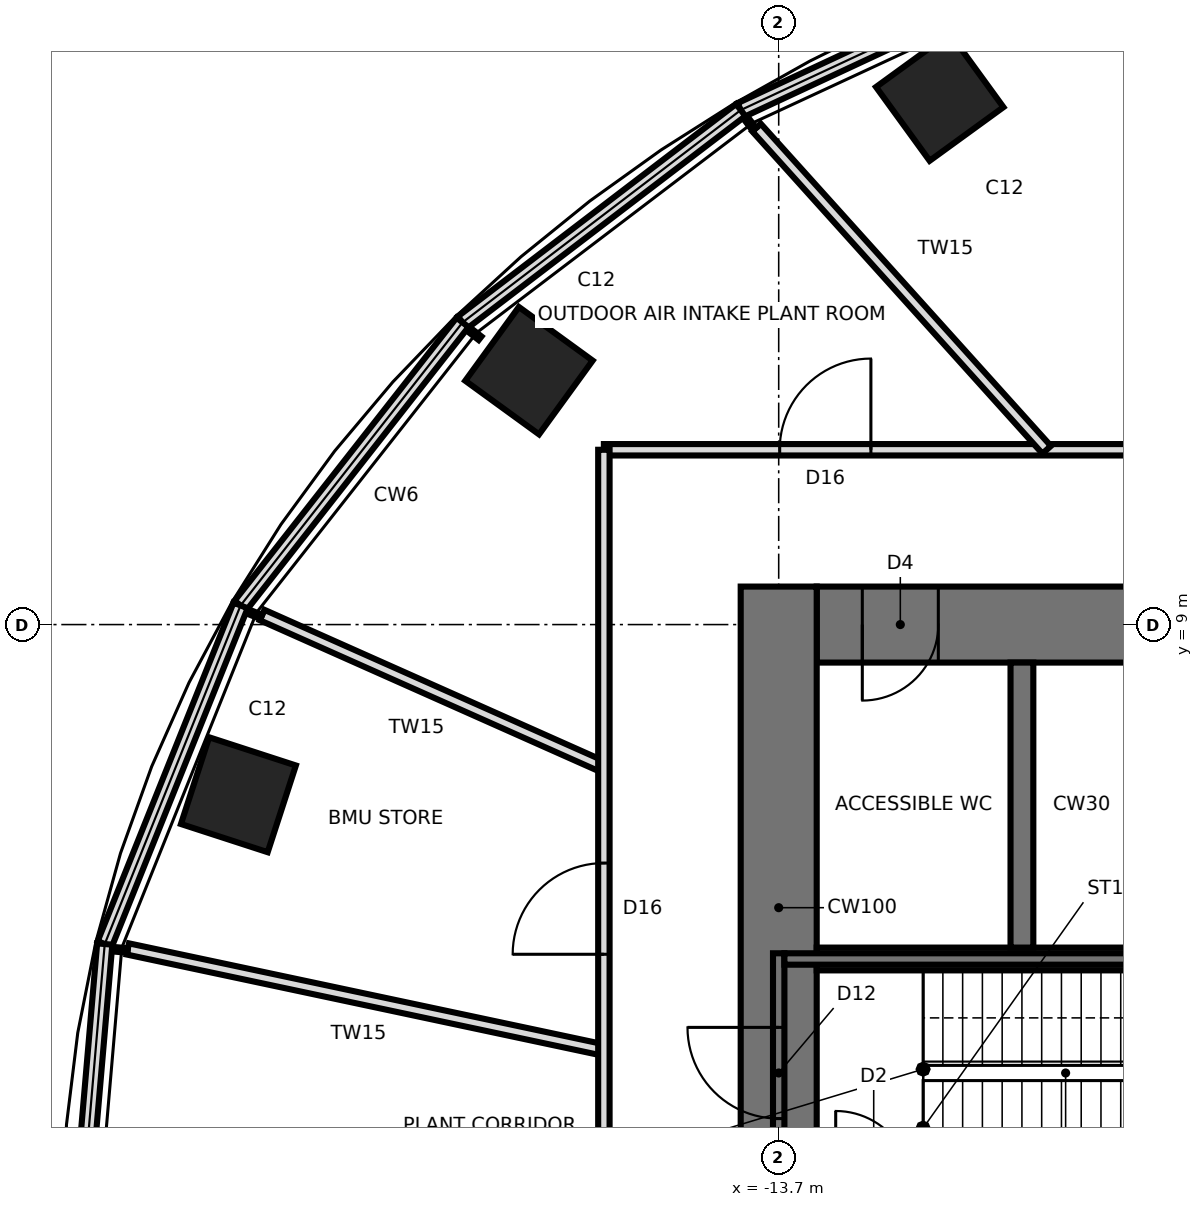
"""IFC4 building model, lengths in metres.
Left out: names, types, materials, properties, quantities, classifications, styles, units other than length and angle.
Written with IfcOpenShell. Run it as: python <this file> out.ifc"""

import sys

from ifc_helpers import new_model, si_unit, direction, frame, frame_2d, origin, origin_2d, place, context, subcontext, project, spatial, rectangle, extrude, element, fill, save


model = new_model("IFC4")
c1 = context("Model", 3, precision=1e-05, world=origin(), true_north=direction((0.0, 1.0)))
c2 = subcontext(c1, "Body", "Model", "MODEL_VIEW")
j1 = project(units=[si_unit("LENGTHUNIT", "METRE"), si_unit("PLANEANGLEUNIT", "RADIAN")], contexts=[c1])
p1 = place(None, origin())
s1 = spatial("IfcSite", under=j1, at=p1, CompositionType="ELEMENT")
p2 = place(p1, origin())
s2 = spatial("IfcBuilding", under=s1, at=p2, CompositionType="ELEMENT")
p3 = place(p2, frame((0.0, 0.0, 277.0)))
s3 = spatial("IfcBuildingStorey", under=s2, at=p3, CompositionType="ELEMENT", Elevation=277.0)
for number, where, z_axis, x_axis in (
    (1, (-11.581, 15.94, 0.0), (0.0, 0.0, 1.0), (-0.588, 0.809, 0.0)),
    (2, (-16.986, 12.341, 0.0), (0.0, 0.0, 1.0), (-0.809, 0.588, 0.0)),
    (3, (-20.808, 6.761, 0.0), (0.0, 0.0, 1.0), (-0.951, 0.309, 0.0)),
):
    element("IfcColumn", number, at=place(p3, frame(where, z_axis=z_axis, x_axis=x_axis)), inside=s3, PredefinedType="COLUMN", context=c2, shape_type="SweptSolid", body=[
        extrude(rectangle(XDim=1.2, YDim=1.2, at=origin_2d()), origin(), (0.0, 0.0, 1.0), 5.0),
    ])
p4 = place(p3, frame((13.2, 9.0, 0.0), z_axis=(0.0, 0.0, 1.0), x_axis=(-1.0, 0.0, 0.0)))
e4 = element("IfcWall", 4, at=p4, inside=s3, PredefinedType="SHEAR", context=c2, shape_type="SweptSolid", body=[
    extrude(rectangle(XDim=26.4, YDim=1.0, at=frame_2d((13.2, 0.0))), origin(), (0.0, 0.0, 1.0), 5.0),
])
p5 = place(p4, frame((2.65, 0.0, 0.0)))
e5 = element("IfcOpeningElement", 5, at=p5, cuts=e4, PredefinedType="OPENING", context=c2, shape_type="SweptSolid", body=[
    extrude(rectangle(XDim=0.9, YDim=2.1, at=frame_2d((0.45, 1.05))), frame((0.0, 0.51, 0.0), z_axis=(0.0, -1.0, 0.0), x_axis=(1.0, 0.0, 0.0)), (0.0, 0.0, 1.0), 1.02),
])
p6 = place(p4, frame((9.5, 0.0, 0.0)))
e6 = element("IfcOpeningElement", 6, at=p6, cuts=e4, PredefinedType="OPENING", context=c2, shape_type="SweptSolid", body=[
    extrude(rectangle(XDim=0.9, YDim=2.1, at=frame_2d((0.45, 1.05))), frame((0.0, 0.51, 0.0), z_axis=(0.0, -1.0, 0.0), x_axis=(1.0, 0.0, 0.0)), (0.0, 0.0, 1.0), 1.02),
])
p7 = place(p4, frame((16.0, 0.0, 0.0)))
e7 = element("IfcOpeningElement", 7, at=p7, cuts=e4, PredefinedType="OPENING", context=c2, shape_type="SweptSolid", body=[
    extrude(rectangle(XDim=0.9, YDim=2.1, at=frame_2d((0.45, 1.05))), frame((0.0, 0.51, 0.0), z_axis=(0.0, -1.0, 0.0), x_axis=(1.0, 0.0, 0.0)), (0.0, 0.0, 1.0), 1.02),
])
p8 = place(p4, frame((21.25, 0.0, 0.0)))
e8 = element("IfcOpeningElement", 8, at=p8, cuts=e4, PredefinedType="OPENING", context=c2, shape_type="SweptSolid", body=[
    extrude(rectangle(XDim=0.9, YDim=2.1, at=frame_2d((0.45, 1.05))), frame((0.0, 0.51, 0.0), z_axis=(0.0, -1.0, 0.0), x_axis=(1.0, 0.0, 0.0)), (0.0, 0.0, 1.0), 1.02),
])
p9 = place(p4, frame((24.8, 0.0, 0.0)))
e9 = element("IfcOpeningElement", 9, at=p9, cuts=e4, PredefinedType="OPENING", context=c2, shape_type="SweptSolid", body=[
    extrude(rectangle(XDim=1.0, YDim=2.1, at=frame_2d((0.5, 1.05))), frame((0.0, 0.51, 0.0), z_axis=(0.0, -1.0, 0.0), x_axis=(1.0, 0.0, 0.0)), (0.0, 0.0, 1.0), 1.02),
])
p10 = place(p3, frame((-13.7, 9.5, 0.0), z_axis=(0.0, 0.0, 1.0), x_axis=(0.0, -1.0, 0.0)))
e10 = element("IfcWall", 10, at=p10, inside=s3, PredefinedType="SHEAR", context=c2, shape_type="SweptSolid", body=[
    extrude(rectangle(XDim=19.0, YDim=1.0, at=frame_2d((9.5, 0.0))), origin(), (0.0, 0.0, 1.0), 5.0),
])
p11 = place(p10, frame((8.6, 0.0, 0.0)))
e11 = element("IfcOpeningElement", 11, at=p11, cuts=e10, PredefinedType="OPENING", context=c2, shape_type="SweptSolid", body=[
    extrude(rectangle(XDim=1.8, YDim=2.4, at=frame_2d((0.9, 1.2))), frame((0.0, 0.51, 0.0), z_axis=(0.0, -1.0, 0.0), x_axis=(1.0, 0.0, 0.0)), (0.0, 0.0, 1.0), 1.02),
])
p12 = place(p3, frame((-13.2, 4.6, 0.0), z_axis=(0.0, 0.0, 1.0), x_axis=(1.0, 0.0, 0.0)))
e12 = element("IfcWall", 12, at=p12, inside=s3, PredefinedType="SHEAR", context=c2, shape_type="SweptSolid", body=[
    extrude(rectangle(XDim=26.4, YDim=0.3, at=frame_2d((13.2, 0.0))), origin(), (0.0, 0.0, 1.0), 5.0),
])
p13 = place(p3, frame((-10.5, 4.75, 0.0), z_axis=(0.0, 0.0, 1.0), x_axis=(0.0, 1.0, 0.0)))
e13 = element("IfcWall", 13, at=p13, inside=s3, PredefinedType="SHEAR", context=c2, shape_type="SweptSolid", body=[
    extrude(rectangle(XDim=3.75, YDim=0.3, at=frame_2d((1.875, 0.0))), origin(), (0.0, 0.0, 1.0), 5.0),
])
p14 = place(p3, frame((-10.186, 17.642, 5.0), z_axis=(0.0, 0.0, 1.0), x_axis=(-0.906246502857, -0.422749661217, 0.0)))
e14 = element("IfcWall", 14, at=p14, inside=s3, PredefinedType="PARAPET", context=c2, shape_type="SweptSolid", body=[
    extrude(rectangle(XDim=4.429, YDim=0.2, at=frame_2d((2.214, 0.0))), origin(), (0.0, 0.0, 1.0), 0.4),
])
p15 = place(p3, frame((-14.199, 15.77, 5.0), z_axis=(0.0, 0.0, 1.0), x_axis=(-0.794855686591, -0.606798514743, 0.0)))
e15 = element("IfcWall", 15, at=p15, inside=s3, PredefinedType="PARAPET", context=c2, shape_type="SweptSolid", body=[
    extrude(rectangle(XDim=4.605, YDim=0.2, at=frame_2d((2.302, 0.0))), origin(), (0.0, 0.0, 1.0), 0.4),
])
p16 = place(p3, frame((-17.859, 12.976, 5.0), z_axis=(0.0, 0.0, 1.0), x_axis=(-0.617103610012, -0.78688190633, 0.0)))
e16 = element("IfcWall", 16, at=p16, inside=s3, PredefinedType="PARAPET", context=c2, shape_type="SweptSolid", body=[
    extrude(rectangle(XDim=4.732, YDim=0.2, at=frame_2d((2.366, 0.0))), origin(), (0.0, 0.0, 1.0), 0.4),
])
p17 = place(p3, frame((-20.78, 9.252, 5.0), z_axis=(0.0, 0.0, 1.0), x_axis=(-0.372363873994, -0.928086819939, 0.0)))
e17 = element("IfcWall", 17, at=p17, inside=s3, PredefinedType="PARAPET", context=c2, shape_type="SweptSolid", body=[
    extrude(rectangle(XDim=4.8, YDim=0.2, at=frame_2d((2.4, 0.0))), origin(), (0.0, 0.0, 1.0), 0.4),
])
p18 = place(p3, frame((-22.567, 4.797, 5.0), z_axis=(0.0, 0.0, 1.0), x_axis=(-0.085747752545, -0.996316878776, 0.0)))
e18 = element("IfcWall", 18, at=p18, inside=s3, PredefinedType="PARAPET", context=c2, shape_type="SweptSolid", body=[
    extrude(rectangle(XDim=4.815, YDim=0.2, at=frame_2d((2.407, 0.0))), origin(), (0.0, 0.0, 1.0), 0.4),
])
p19 = place(p3, frame((16.0, 11.3, 0.0), z_axis=(0.0, 0.0, 1.0), x_axis=(-1.0, 0.0, 0.0)))
e19 = element("IfcWall", 19, at=p19, inside=s3, PredefinedType="PARTITIONING", context=c2, shape_type="SweptSolid", body=[
    extrude(rectangle(XDim=32.0, YDim=0.15, at=frame_2d((16.0, 0.0))), origin(), (0.0, 0.0, 1.0), 4.75),
])
p20 = place(p19, frame((3.813, 0.0, 0.0)))
e20 = element("IfcOpeningElement", 20, at=p20, cuts=e19, PredefinedType="OPENING", context=c2, shape_type="SweptSolid", body=[
    extrude(rectangle(XDim=1.8, YDim=2.4, at=frame_2d((0.9, 1.2))), frame((0.0, 0.085, 0.0), z_axis=(0.0, -1.0, 0.0), x_axis=(1.0, 0.0, 0.0)), (0.0, 0.0, 1.0), 0.17),
])
p21 = place(p19, frame((12.732, 0.0, 0.0)))
e21 = element("IfcOpeningElement", 21, at=p21, cuts=e19, PredefinedType="OPENING", context=c2, shape_type="SweptSolid", body=[
    extrude(rectangle(XDim=1.2, YDim=2.1, at=frame_2d((0.6, 1.05))), frame((0.0, 0.085, 0.0), z_axis=(0.0, -1.0, 0.0), x_axis=(1.0, 0.0, 0.0)), (0.0, 0.0, 1.0), 0.17),
])
p22 = place(p19, frame((20.806, 0.0, 0.0)))
e22 = element("IfcOpeningElement", 22, at=p22, cuts=e19, PredefinedType="OPENING", context=c2, shape_type="SweptSolid", body=[
    extrude(rectangle(XDim=1.8, YDim=2.4, at=frame_2d((0.9, 1.2))), frame((0.0, 0.085, 0.0), z_axis=(0.0, -1.0, 0.0), x_axis=(1.0, 0.0, 0.0)), (0.0, 0.0, 1.0), 0.17),
])
p23 = place(p19, frame((28.487, 0.0, 0.0)))
e23 = element("IfcOpeningElement", 23, at=p23, cuts=e19, PredefinedType="OPENING", context=c2, shape_type="SweptSolid", body=[
    extrude(rectangle(XDim=1.2, YDim=2.1, at=frame_2d((0.6, 1.05))), frame((0.0, 0.085, 0.0), z_axis=(0.0, -1.0, 0.0), x_axis=(1.0, 0.0, 0.0)), (0.0, 0.0, 1.0), 0.17),
])
p24 = place(p3, frame((-10.175, 11.3, 0.0), z_axis=(0.0, 0.0, 1.0), x_axis=(-0.669139686494, 0.743136649586, 0.0)))
e24 = element("IfcWall", 24, at=p24, inside=s3, PredefinedType="PARTITIONING", context=c2, shape_type="SweptSolid", body=[
    extrude(rectangle(XDim=5.705, YDim=0.15, at=frame_2d((2.852, 0.0))), origin(), (0.0, 0.0, 1.0), 4.75),
])
p25 = place(p3, frame((-16.0, 7.124, 0.0), z_axis=(0.0, 0.0, 1.0), x_axis=(-0.913549547766, 0.406727456384, 0.0)))
e25 = element("IfcWall", 25, at=p25, inside=s3, PredefinedType="PARTITIONING", context=c2, shape_type="SweptSolid", body=[
    extrude(rectangle(XDim=4.922, YDim=0.15, at=frame_2d((2.461, 0.0))), origin(), (0.0, 0.0, 1.0), 4.75),
])
p26 = place(p3, frame((-16.0, 3.401, 0.0), z_axis=(0.0, 0.0, 1.0), x_axis=(-0.97814421791, 0.207927605117, 0.0)))
e26 = element("IfcWall", 26, at=p26, inside=s3, PredefinedType="PARTITIONING", context=c2, shape_type="SweptSolid", body=[
    extrude(rectangle(XDim=6.404, YDim=0.15, at=frame_2d((3.202, 0.0))), origin(), (0.0, 0.0, 1.0), 4.75),
])
p27 = place(p3, frame((-16.0, 11.3, 0.0), z_axis=(0.0, 0.0, 1.0), x_axis=(0.0, -1.0, 0.0)))
e27 = element("IfcWall", 27, at=p27, inside=s3, PredefinedType="PARTITIONING", context=c2, shape_type="SweptSolid", body=[
    extrude(rectangle(XDim=22.6, YDim=0.15, at=frame_2d((11.3, 0.0))), origin(), (0.0, 0.0, 1.0), 4.75),
])
p28 = place(p27, frame((5.438, 0.0, 0.0)))
e28 = element("IfcOpeningElement", 28, at=p28, cuts=e27, PredefinedType="OPENING", context=c2, shape_type="SweptSolid", body=[
    extrude(rectangle(XDim=1.2, YDim=2.1, at=frame_2d((0.6, 1.05))), frame((0.0, 0.085, 0.0), z_axis=(0.0, -1.0, 0.0), x_axis=(1.0, 0.0, 0.0)), (0.0, 0.0, 1.0), 0.17),
])
p29 = place(p27, frame((12.261, 0.0, 0.0)))
e29 = element("IfcOpeningElement", 29, at=p29, cuts=e27, PredefinedType="OPENING", context=c2, shape_type="SweptSolid", body=[
    extrude(rectangle(XDim=1.8, YDim=2.4, at=frame_2d((0.9, 1.2))), frame((0.0, 0.085, 0.0), z_axis=(0.0, -1.0, 0.0), x_axis=(1.0, 0.0, 0.0)), (0.0, 0.0, 1.0), 0.17),
])
p30 = place(p3, frame((-13.7, 1.525, 5.0), z_axis=(0.0, 0.0, 1.0), x_axis=(0.0, 1.0, 0.0)))
e30 = element("IfcWall", 30, at=p30, inside=s3, PredefinedType="SOLIDWALL", context=c2, shape_type="SweptSolid", body=[
    extrude(rectangle(XDim=3.15, YDim=0.15, at=frame_2d((1.575, 0.0))), origin(), (0.0, 0.0, 1.0), 2.82),
])
p31 = place(p30, frame((0.975, 0.0, 0.0)))
e31 = element("IfcOpeningElement", 31, at=p31, cuts=e30, PredefinedType="OPENING", context=c2, shape_type="SweptSolid", body=[
    extrude(rectangle(XDim=1.2, YDim=2.1, at=frame_2d((0.6, 1.05))), frame((0.0, 0.085, 0.0), z_axis=(0.0, -1.0, 0.0), x_axis=(1.0, 0.0, 0.0)), (0.0, 0.0, 1.0), 0.17),
])
p32 = place(p3, frame((-13.625, 4.6, 5.0), z_axis=(0.0, 0.0, 1.0), x_axis=(1.0, 0.0, 0.0)))
e32 = element("IfcWall", 32, at=p32, inside=s3, PredefinedType="SOLIDWALL", context=c2, shape_type="SweptSolid", body=[
    extrude(rectangle(XDim=7.05, YDim=0.15, at=frame_2d((3.525, 0.0))), origin(), (0.0, 0.0, 1.0), 2.82),
])
p33 = place(p9, origin())
e33 = element("IfcDoor", 33, at=p33, inside=s3, OperationType="SINGLE_SWING_RIGHT", PredefinedType="DOOR", context=c2, shape_type="SweptSolid", body=[
    extrude(rectangle(XDim=0.92, YDim=2.06, at=frame_2d((0.5, 1.03))), frame((0.0, 0.025, 0.0), z_axis=(0.0, -1.0, 0.0), x_axis=(1.0, 0.0, 0.0)), (0.0, 0.0, 1.0), 0.05),
    extrude(rectangle(XDim=0.04, YDim=2.1, at=frame_2d((0.02, 1.05))), frame((0.0, 0.25, 0.0), z_axis=(0.0, -1.0, 0.0), x_axis=(1.0, 0.0, 0.0)), (0.0, 0.0, 1.0), 0.5),
    extrude(rectangle(XDim=0.04, YDim=2.1, at=frame_2d((0.98, 1.05))), frame((0.0, 0.25, 0.0), z_axis=(0.0, -1.0, 0.0), x_axis=(1.0, 0.0, 0.0)), (0.0, 0.0, 1.0), 0.5),
    extrude(rectangle(XDim=0.92, YDim=0.04, at=frame_2d((0.5, 2.08))), frame((0.0, 0.25, 0.0), z_axis=(0.0, -1.0, 0.0), x_axis=(1.0, 0.0, 0.0)), (0.0, 0.0, 1.0), 0.5),
])
fill(e9, e33)
p34 = place(p23, frame((1.2, 0.0, 0.0), z_axis=(0.0, 0.0, 1.0), x_axis=(-1.0, 0.0, 0.0)))
e34 = element("IfcDoor", 34, at=p34, inside=s3, OperationType="SINGLE_SWING_RIGHT", PredefinedType="DOOR", context=c2, shape_type="SweptSolid", body=[
    extrude(rectangle(XDim=1.2, YDim=2.1, at=frame_2d((0.6, 1.05))), frame((0.0, 0.025, 0.0), z_axis=(0.0, -1.0, 0.0), x_axis=(1.0, 0.0, 0.0)), (0.0, 0.0, 1.0), 0.05),
])
fill(e23, e34)
p35 = place(p28, frame((1.2, 0.0, 0.0), z_axis=(0.0, 0.0, 1.0), x_axis=(-1.0, 0.0, 0.0)))
e35 = element("IfcDoor", 35, at=p35, inside=s3, OperationType="SINGLE_SWING_LEFT", PredefinedType="DOOR", context=c2, shape_type="SweptSolid", body=[
    extrude(rectangle(XDim=1.2, YDim=2.1, at=frame_2d((0.6, 1.05))), frame((0.0, 0.025, 0.0), z_axis=(0.0, -1.0, 0.0), x_axis=(1.0, 0.0, 0.0)), (0.0, 0.0, 1.0), 0.05),
])
fill(e28, e35)
p36 = place(p31, origin())
e36 = element("IfcDoor", 36, at=p36, inside=s3, OperationType="SINGLE_SWING_RIGHT", PredefinedType="DOOR", context=c2, shape_type="SweptSolid", body=[
    extrude(rectangle(XDim=1.2, YDim=2.1, at=frame_2d((0.6, 1.05))), frame((0.0, 0.025, 0.0), z_axis=(0.0, -1.0, 0.0), x_axis=(1.0, 0.0, 0.0)), (0.0, 0.0, 1.0), 0.05),
])
fill(e31, e36)
save(model, sys.argv[1])
